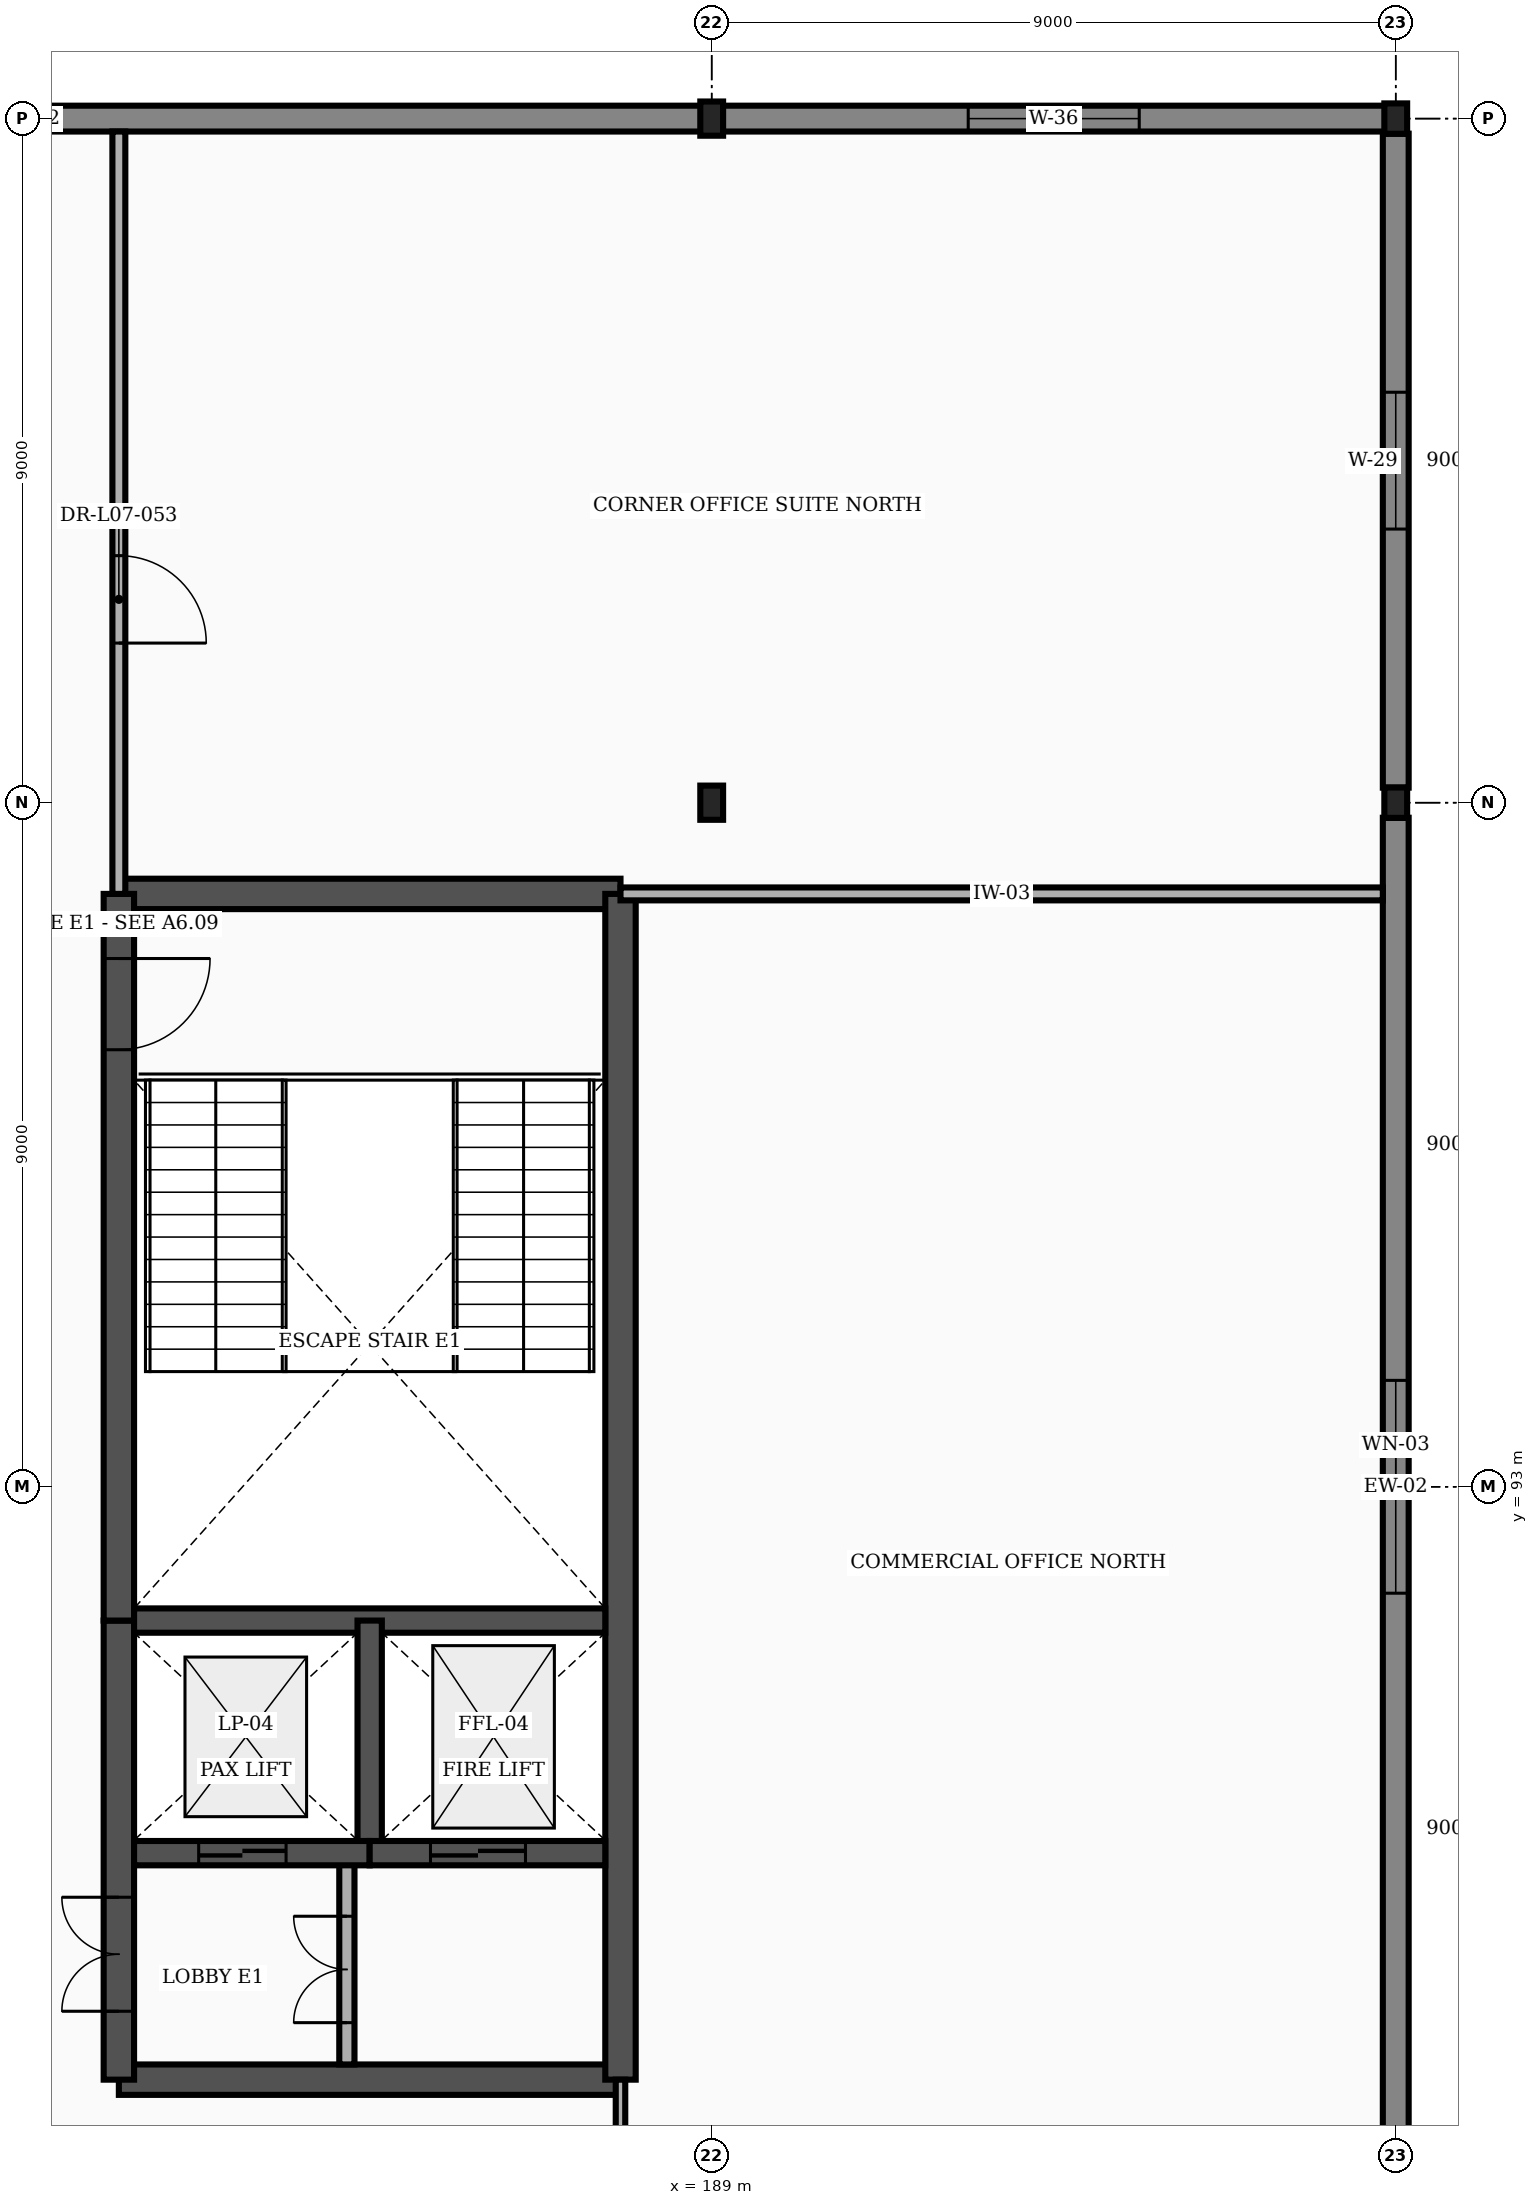
"""IFC4 building model, lengths in metres.
Left out: names, types, materials, properties, quantities, classifications, styles, units other than length and angle.
Written with IfcOpenShell. Run it as: python <this file> out.ifc"""

import sys

from ifc_helpers import new_model, si_unit, direction, frame, frame_2d, origin, origin_2d, place, context, subcontext, project, spatial, rectangle, i_section, extrude, element, fill, save


model = new_model("IFC4")
c1 = context("Model", 3, precision=1e-05, world=origin(), true_north=direction((0.0, 1.0)))
c2 = subcontext(c1, "Body", "Model", "MODEL_VIEW")
j1 = project(units=[si_unit("LENGTHUNIT", "METRE"), si_unit("PLANEANGLEUNIT", "RADIAN")], contexts=[c1])
p1 = place(None, origin())
s1 = spatial("IfcSite", under=j1, at=p1, CompositionType="ELEMENT")
p2 = place(p1, origin())
s2 = spatial("IfcBuilding", under=s1, at=p2, CompositionType="ELEMENT")
p3 = place(p2, frame((0.0, 0.0, 33.3)))
s3 = spatial("IfcBuildingStorey", under=s2, at=p3, CompositionType="ELEMENT", Elevation=33.3)
for number, where, z_axis, x_axis in (
    (1, (189.0, 102.0, 0.0), (0.0, 0.0, 1.0), (1.0, 0.0, 0.0)),
    (2, (189.0, 111.0, 0.0), (0.0, 0.0, 1.0), (1.0, 0.0, 0.0)),
):
    element("IfcColumn", number, at=place(p3, frame(where, z_axis=z_axis, x_axis=x_axis)), inside=s3, PredefinedType="COLUMN", context=c2, shape_type="SweptSolid", body=[
        extrude(i_section(OverallWidth=0.3, OverallDepth=0.45, WebThickness=0.014, FlangeThickness=0.026, FilletRadius=0.027, at=origin_2d()), origin(), (0.0, 0.0, 1.0), 4.5),
    ])
for number, where, z_axis, x_axis in (
    (3, (198.0, 102.0, 0.0), (0.0, 0.0, 1.0), (1.0, 0.0, 0.0)),
    (4, (198.0, 111.0, 0.0), (0.0, 0.0, 1.0), (1.0, 0.0, 0.0)),
):
    element("IfcColumn", number, at=place(p3, frame(where, z_axis=z_axis, x_axis=x_axis)), inside=s3, PredefinedType="COLUMN", context=c2, shape_type="SweptSolid", body=[
        extrude(i_section(OverallWidth=0.3, OverallDepth=0.4, WebThickness=0.013, FlangeThickness=0.024, FilletRadius=0.027, at=origin_2d()), origin(), (0.0, 0.0, 1.0), 4.5),
    ])
p4 = place(p3, frame((171.01, 111.0, 0.0), z_axis=(0.0, 0.0, 1.0), x_axis=(1.0, 0.0, 0.0)))
e5 = element("IfcWall", 5, at=p4, inside=s3, PredefinedType="STANDARD", context=c2, shape_type="SweptSolid", body=[
    extrude(rectangle(XDim=17.98, YDim=0.34, at=frame_2d((8.99, 0.0))), origin(), (0.0, 0.0, 1.0), 3.493),
])
p5 = place(p4, frame((0.65, 0.0, 0.85)))
e6 = element("IfcOpeningElement", 6, at=p5, cuts=e5, PredefinedType="OPENING", context=c2, shape_type="SweptSolid", body=[
    extrude(rectangle(XDim=2.8, YDim=2.25, at=frame_2d((1.4, 1.125))), frame((0.0, 0.182, 0.0), z_axis=(0.0, -1.0, 0.0), x_axis=(1.0, 0.0, 0.0)), (0.0, 0.0, 1.0), 0.364),
])
p6 = place(p3, frame((189.01, 111.0, 0.0), z_axis=(0.0, 0.0, 1.0), x_axis=(1.0, 0.0, 0.0)))
e7 = element("IfcWall", 7, at=p6, inside=s3, PredefinedType="STANDARD", context=c2, shape_type="SweptSolid", body=[
    extrude(rectangle(XDim=8.98, YDim=0.34, at=frame_2d((4.49, 0.0))), origin(), (0.0, 0.0, 1.0), 4.255),
])
p7 = place(p6, frame((3.365, 0.0, 0.85)))
e8 = element("IfcOpeningElement", 8, at=p7, cuts=e7, PredefinedType="OPENING", context=c2, shape_type="SweptSolid", body=[
    extrude(rectangle(XDim=2.25, YDim=2.0, at=frame_2d((1.125, 1.0))), frame((0.0, 0.182, 0.0), z_axis=(0.0, -1.0, 0.0), x_axis=(1.0, 0.0, 0.0)), (0.0, 0.0, 1.0), 0.364),
])
p8 = place(p3, frame((198.0, 84.198, 0.0), z_axis=(0.0, 0.0, 1.0), x_axis=(0.0, 1.0, 0.0)))
e9 = element("IfcWall", 9, at=p8, inside=s3, PredefinedType="STANDARD", context=c2, shape_type="SweptSolid", body=[
    extrude(rectangle(XDim=17.604, YDim=0.34, at=frame_2d((8.802, 0.0))), origin(), (0.0, 0.0, 1.0), 3.643),
])
p9 = place(p8, frame((7.402, 0.0, 0.85)))
e10 = element("IfcOpeningElement", 10, at=p9, cuts=e9, PredefinedType="OPENING", context=c2, shape_type="SweptSolid", body=[
    extrude(rectangle(XDim=2.8, YDim=2.25, at=frame_2d((1.4, 1.125))), frame((0.0, 0.182, 0.0), z_axis=(0.0, -1.0, 0.0), x_axis=(1.0, 0.0, 0.0)), (0.0, 0.0, 1.0), 0.364),
])
p10 = place(p3, frame((198.0, 102.198, 0.0), z_axis=(0.0, 0.0, 1.0), x_axis=(0.0, 1.0, 0.0)))
e11 = element("IfcWall", 11, at=p10, inside=s3, PredefinedType="STANDARD", context=c2, shape_type="SweptSolid", body=[
    extrude(rectangle(XDim=8.604, YDim=0.34, at=frame_2d((4.302, 0.0))), origin(), (0.0, 0.0, 1.0), 4.255),
])
p11 = place(p10, frame((3.402, 0.0, 0.85)))
e12 = element("IfcOpeningElement", 12, at=p11, cuts=e11, PredefinedType="OPENING", context=c2, shape_type="SweptSolid", body=[
    extrude(rectangle(XDim=1.8, YDim=1.95, at=frame_2d((0.9, 0.975))), frame((0.0, 0.182, 0.0), z_axis=(0.0, -1.0, 0.0), x_axis=(1.0, 0.0, 0.0)), (0.0, 0.0, 1.0), 0.364),
])
for number, where, z_axis, x_axis in (
    (13, (181.2, 85.2, 0.0), (0.0, 0.0, 1.0), (1.0, 0.0, 0.0)),
    (14, (181.2, 100.8, 0.0), (0.0, 0.0, 1.0), (1.0, 0.0, 0.0)),
):
    element("IfcWall", number, at=place(p3, frame(where, z_axis=z_axis, x_axis=x_axis)), inside=s3, PredefinedType="SHEAR", context=c2, shape_type="SweptSolid", body=[
        extrude(rectangle(XDim=6.6, YDim=0.4, at=frame_2d((3.3, 0.0))), origin(), (0.0, 0.0, 1.0), 4.255),
    ])
p12 = place(p3, frame((187.8, 85.2, 0.0), z_axis=(0.0, 0.0, 1.0), x_axis=(0.0, 1.0, 0.0)))
e15 = element("IfcWall", 15, at=p12, inside=s3, PredefinedType="SHEAR", context=c2, shape_type="SweptSolid", body=[
    extrude(rectangle(XDim=15.6, YDim=0.4, at=frame_2d((7.8, 0.0))), origin(), (0.0, 0.0, 1.0), 4.255),
])
p13 = place(p3, frame((181.2, 85.2, 0.0), z_axis=(0.0, 0.0, 1.0), x_axis=(0.0, 1.0, 0.0)))
e16 = element("IfcWall", 16, at=p13, inside=s3, PredefinedType="SHEAR", context=c2, shape_type="SweptSolid", body=[
    extrude(rectangle(XDim=6.04, YDim=0.4, at=frame_2d((3.02, 0.0))), origin(), (0.0, 0.0, 1.0), 4.255),
])
p14 = place(p13, frame((0.9, 0.0, 0.0)))
e17 = element("IfcOpeningElement", 17, at=p14, cuts=e16, PredefinedType="OPENING", context=c2, shape_type="SweptSolid", body=[
    extrude(rectangle(XDim=1.5, YDim=2.2, at=frame_2d((0.75, 1.1))), frame((0.0, 0.212, 0.0), z_axis=(0.0, -1.0, 0.0), x_axis=(1.0, 0.0, 0.0)), (0.0, 0.0, 1.0), 0.424),
])
p15 = place(p3, frame((181.2, 91.24, 0.0), z_axis=(0.0, 0.0, 1.0), x_axis=(0.0, 1.0, 0.0)))
e18 = element("IfcWall", 18, at=p15, inside=s3, PredefinedType="SHEAR", context=c2, shape_type="SweptSolid", body=[
    extrude(rectangle(XDim=9.56, YDim=0.4, at=frame_2d((4.78, 0.0))), origin(), (0.0, 0.0, 1.0), 4.255),
])
p16 = place(p15, frame((7.51, 0.0, 0.0)))
e19 = element("IfcOpeningElement", 19, at=p16, cuts=e18, PredefinedType="OPENING", context=c2, shape_type="SweptSolid", body=[
    extrude(rectangle(XDim=1.2, YDim=2.2, at=frame_2d((0.6, 1.1))), frame((0.0, 0.212, 0.0), z_axis=(0.0, -1.0, 0.0), x_axis=(1.0, 0.0, 0.0)), (0.0, 0.0, 1.0), 0.424),
])
p17 = place(p3, frame((181.4, 91.24, 0.0), z_axis=(0.0, 0.0, 1.0), x_axis=(1.0, 0.0, 0.0)))
e20 = element("IfcWall", 20, at=p17, inside=s3, PredefinedType="SHEAR", context=c2, shape_type="SweptSolid", body=[
    extrude(rectangle(XDim=6.2, YDim=0.32, at=frame_2d((3.1, 0.0))), origin(), (0.0, 0.0, 1.0), 4.255),
])
p18 = place(p3, frame((184.5, 88.18, 0.0), z_axis=(0.0, 0.0, 1.0), x_axis=(0.0, 1.0, 0.0)))
e21 = element("IfcWall", 21, at=p18, inside=s3, PredefinedType="SHEAR", context=c2, shape_type="SweptSolid", body=[
    extrude(rectangle(XDim=3.06, YDim=0.32, at=frame_2d((1.53, 0.0))), origin(), (0.0, 0.0, 1.0), 4.255),
])
p19 = place(p3, frame((184.2, 85.4, 0.0), z_axis=(0.0, 0.0, 1.0), x_axis=(0.0, 1.0, 0.0)))
e22 = element("IfcWall", 22, at=p19, inside=s3, PredefinedType="PARTITIONING", context=c2, shape_type="SweptSolid", body=[
    extrude(rectangle(XDim=2.78, YDim=0.2, at=frame_2d((1.39, 0.0))), origin(), (0.0, 0.0, 1.0), 4.255),
])
p20 = place(p19, frame((0.55, 0.0, 0.0)))
e23 = element("IfcOpeningElement", 23, at=p20, cuts=e22, PredefinedType="OPENING", context=c2, shape_type="SweptSolid", body=[
    extrude(rectangle(XDim=1.4, YDim=2.25, at=frame_2d((0.7, 1.125))), frame((0.0, 0.112, 0.0), z_axis=(0.0, -1.0, 0.0), x_axis=(1.0, 0.0, 0.0)), (0.0, 0.0, 1.0), 0.224),
])
p21 = place(p3, frame((181.4, 88.18, 0.0), z_axis=(0.0, 0.0, 1.0), x_axis=(1.0, 0.0, 0.0)))
e24 = element("IfcWall", 24, at=p21, inside=s3, PredefinedType="SHEAR", context=c2, shape_type="SweptSolid", body=[
    extrude(rectangle(XDim=3.1, YDim=0.32, at=frame_2d((1.55, 0.0))), origin(), (0.0, 0.0, 1.0), 4.255),
])
p22 = place(p21, frame((0.85, 0.0, 0.0)))
e25 = element("IfcOpeningElement", 25, at=p22, cuts=e24, PredefinedType="OPENING", context=c2, shape_type="SweptSolid", body=[
    extrude(rectangle(XDim=1.15, YDim=2.2, at=frame_2d((0.575, 1.1))), frame((0.0, 0.172, 0.0), z_axis=(0.0, -1.0, 0.0), x_axis=(1.0, 0.0, 0.0)), (0.0, 0.0, 1.0), 0.344),
])
p23 = place(p3, frame((184.5, 88.18, 0.0), z_axis=(0.0, 0.0, 1.0), x_axis=(1.0, 0.0, 0.0)))
e26 = element("IfcWall", 26, at=p23, inside=s3, PredefinedType="SHEAR", context=c2, shape_type="SweptSolid", body=[
    extrude(rectangle(XDim=3.1, YDim=0.32, at=frame_2d((1.55, 0.0))), origin(), (0.0, 0.0, 1.0), 4.255),
])
p24 = place(p23, frame((0.8, 0.0, 0.0)))
e27 = element("IfcOpeningElement", 27, at=p24, cuts=e26, PredefinedType="OPENING", context=c2, shape_type="SweptSolid", body=[
    extrude(rectangle(XDim=1.25, YDim=2.25, at=frame_2d((0.625, 1.125))), frame((0.0, 0.172, 0.0), z_axis=(0.0, -1.0, 0.0), x_axis=(1.0, 0.0, 0.0)), (0.0, 0.0, 1.0), 0.344),
])
p25 = place(p3, frame((187.8, 83.2, 0.0), z_axis=(0.0, 0.0, 1.0), x_axis=(0.0, 1.0, 0.0)))
e28 = element("IfcWall", 28, at=p25, inside=s3, PredefinedType="PARTITIONING", context=c2, shape_type="SweptSolid", body=[
    extrude(rectangle(XDim=2.0, YDim=0.125, at=frame_2d((1.0, 0.0))), origin(), (0.0, 0.0, 1.0), 4.255),
])
p26 = place(p3, frame((187.8, 100.8, 0.0), z_axis=(0.0, 0.0, 1.0), x_axis=(1.0, 0.0, 0.0)))
e29 = element("IfcWall", 29, at=p26, inside=s3, PredefinedType="PARTITIONING", context=c2, shape_type="SweptSolid", body=[
    extrude(rectangle(XDim=10.03, YDim=0.17, at=frame_2d((5.015, 0.0))), origin(), (0.0, 0.0, 1.0), 4.255),
])
p27 = place(p3, frame((181.2, 100.8, 0.0), z_axis=(0.0, 0.0, 1.0), x_axis=(0.0, 1.0, 0.0)))
e30 = element("IfcWall", 30, at=p27, inside=s3, PredefinedType="PARTITIONING", context=c2, shape_type="SweptSolid", body=[
    extrude(rectangle(XDim=10.03, YDim=0.17, at=frame_2d((5.015, 0.0))), origin(), (0.0, 0.0, 1.0), 4.255),
])
p28 = place(p27, frame((3.3, 0.0, 0.0)))
e31 = element("IfcOpeningElement", 31, at=p28, cuts=e30, PredefinedType="OPENING", context=c2, shape_type="SweptSolid", body=[
    extrude(rectangle(XDim=1.15, YDim=2.15, at=frame_2d((0.575, 1.075))), frame((0.0, 0.097, 0.0), z_axis=(0.0, -1.0, 0.0), x_axis=(1.0, 0.0, 0.0)), (0.0, 0.0, 1.0), 0.194),
])
p29 = place(p7, origin())
e32 = element("IfcWindow", 32, at=p29, inside=s3, PartitioningType="SINGLE_PANEL", PredefinedType="WINDOW", context=c2, shape_type="SweptSolid", body=[
    extrude(rectangle(XDim=2.25, YDim=2.0, at=frame_2d((1.125, 1.0))), frame((0.0, 0.03, 0.0), z_axis=(0.0, -1.0, 0.0), x_axis=(1.0, 0.0, 0.0)), (0.0, 0.0, 1.0), 0.06),
])
fill(e8, e32)
p30 = place(p9, origin())
e33 = element("IfcWindow", 33, at=p30, inside=s3, PartitioningType="SINGLE_PANEL", PredefinedType="WINDOW", context=c2, shape_type="SweptSolid", body=[
    extrude(rectangle(XDim=2.8, YDim=2.25, at=frame_2d((1.4, 1.125))), frame((0.0, 0.03, 0.0), z_axis=(0.0, -1.0, 0.0), x_axis=(1.0, 0.0, 0.0)), (0.0, 0.0, 1.0), 0.06),
])
fill(e10, e33)
p31 = place(p11, origin())
e34 = element("IfcWindow", 34, at=p31, inside=s3, PartitioningType="SINGLE_PANEL", PredefinedType="WINDOW", context=c2, shape_type="SweptSolid", body=[
    extrude(rectangle(XDim=1.8, YDim=1.95, at=frame_2d((0.9, 0.975))), frame((0.0, 0.03, 0.0), z_axis=(0.0, -1.0, 0.0), x_axis=(1.0, 0.0, 0.0)), (0.0, 0.0, 1.0), 0.06),
])
fill(e12, e34)
p32 = place(p14, origin())
e35 = element("IfcDoor", 35, at=p32, inside=s3, OperationType="DOUBLE_DOOR_SINGLE_SWING", PredefinedType="DOOR", context=c2, shape_type="SweptSolid", body=[
    extrude(rectangle(XDim=1.5, YDim=2.2, at=frame_2d((0.75, 1.1))), frame((0.0, 0.025, 0.0), z_axis=(0.0, -1.0, 0.0), x_axis=(1.0, 0.0, 0.0)), (0.0, 0.0, 1.0), 0.05),
])
fill(e17, e35)
p33 = place(p16, frame((1.2, 0.0, 0.0), z_axis=(0.0, 0.0, 1.0), x_axis=(-1.0, 0.0, 0.0)))
e36 = element("IfcDoor", 36, at=p33, inside=s3, OperationType="SINGLE_SWING_LEFT", PredefinedType="DOOR", context=c2, shape_type="SweptSolid", body=[
    extrude(rectangle(XDim=1.2, YDim=2.2, at=frame_2d((0.6, 1.1))), frame((0.0, 0.025, 0.0), z_axis=(0.0, -1.0, 0.0), x_axis=(1.0, 0.0, 0.0)), (0.0, 0.0, 1.0), 0.05),
])
fill(e19, e36)
p34 = place(p20, origin())
e37 = element("IfcDoor", 37, at=p34, inside=s3, OperationType="DOUBLE_DOOR_SINGLE_SWING", PredefinedType="DOOR", context=c2, shape_type="SweptSolid", body=[
    extrude(rectangle(XDim=1.4, YDim=2.25, at=frame_2d((0.7, 1.125))), frame((0.0, 0.025, 0.0), z_axis=(0.0, -1.0, 0.0), x_axis=(1.0, 0.0, 0.0)), (0.0, 0.0, 1.0), 0.05),
])
fill(e23, e37)
p35 = place(p22, origin())
e38 = element("IfcDoor", 38, at=p35, inside=s3, OperationType="DOUBLE_DOOR_SLIDING", PredefinedType="DOOR", context=c2, shape_type="SweptSolid", body=[
    extrude(rectangle(XDim=1.15, YDim=2.2, at=frame_2d((0.575, 1.1))), frame((0.0, 0.025, 0.0), z_axis=(0.0, -1.0, 0.0), x_axis=(1.0, 0.0, 0.0)), (0.0, 0.0, 1.0), 0.05),
])
fill(e25, e38)
p36 = place(p24, origin())
e39 = element("IfcDoor", 39, at=p36, inside=s3, OperationType="DOUBLE_DOOR_SLIDING", PredefinedType="DOOR", context=c2, shape_type="SweptSolid", body=[
    extrude(rectangle(XDim=1.25, YDim=2.25, at=frame_2d((0.625, 1.125))), frame((0.0, 0.025, 0.0), z_axis=(0.0, -1.0, 0.0), x_axis=(1.0, 0.0, 0.0)), (0.0, 0.0, 1.0), 0.05),
])
fill(e27, e39)
p37 = place(p28, frame((1.15, 0.0, 0.0), z_axis=(0.0, 0.0, 1.0), x_axis=(-1.0, 0.0, 0.0)))
e40 = element("IfcDoor", 40, at=p37, inside=s3, OperationType="SINGLE_SWING_RIGHT", PredefinedType="DOOR", context=c2, shape_type="SweptSolid", body=[
    extrude(rectangle(XDim=1.15, YDim=2.15, at=frame_2d((0.575, 1.075))), frame((0.0, 0.025, 0.0), z_axis=(0.0, -1.0, 0.0), x_axis=(1.0, 0.0, 0.0)), (0.0, 0.0, 1.0), 0.05),
])
fill(e31, e40)
save(model, sys.argv[1])
